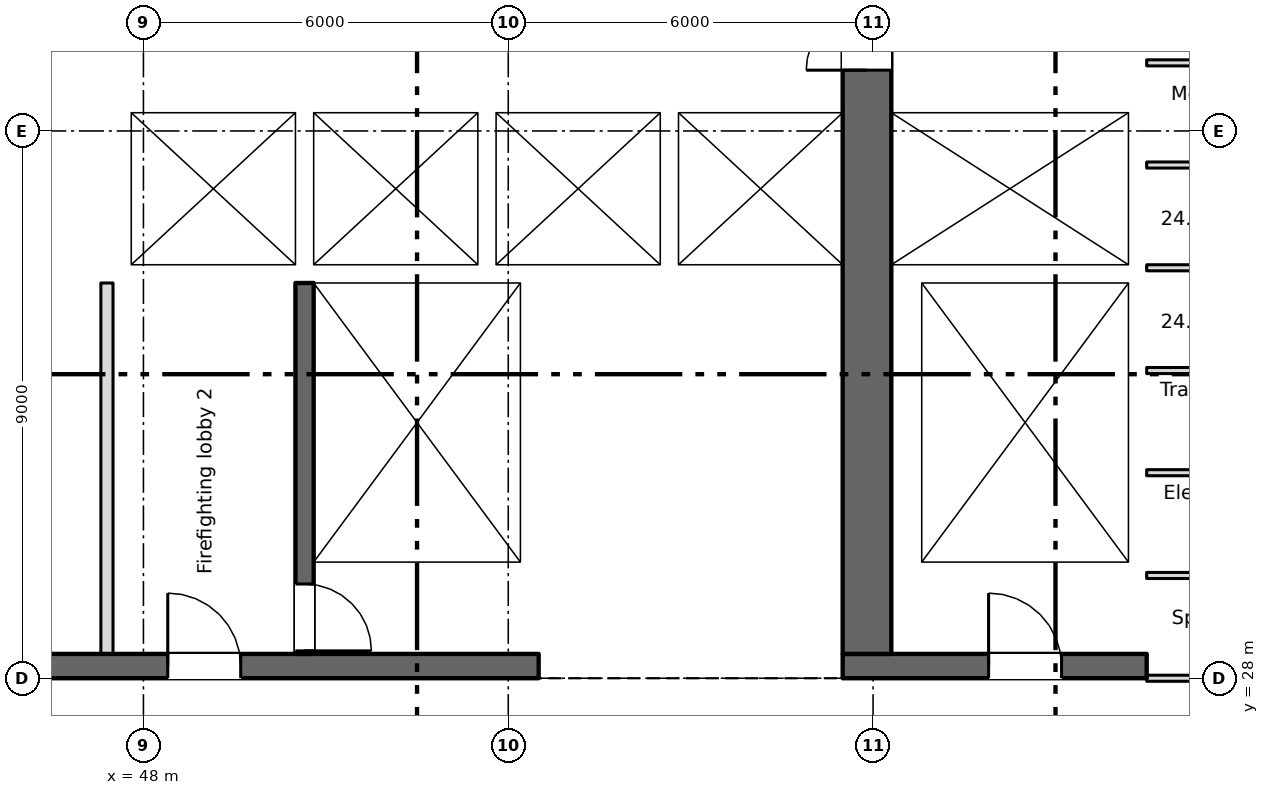
"""IFC4 building model, lengths in metres.
Left out: names, types, materials, properties, quantities, classifications, styles, units other than length and angle.
Written with IfcOpenShell. Run it as: python <this file> out.ifc"""

import sys

from ifc_helpers import new_model, si_unit, direction, frame, frame_2d, origin, place, context, subcontext, project, spatial, rectangle, extrude, element, fill, save


model = new_model("IFC4")
c1 = context("Model", 3, precision=1e-05, world=origin(), true_north=direction((0.0, 1.0)))
c2 = subcontext(c1, "Body", "Model", "MODEL_VIEW")
j1 = project(units=[si_unit("LENGTHUNIT", "METRE"), si_unit("PLANEANGLEUNIT", "RADIAN")], contexts=[c1])
p1 = place(None, origin())
s1 = spatial("IfcSite", under=j1, at=p1, CompositionType="ELEMENT")
p2 = place(p1, origin())
s2 = spatial("IfcBuilding", under=s1, at=p2, CompositionType="ELEMENT")
p3 = place(p2, frame((0.0, 0.0, 158.75)))
s3 = spatial("IfcBuildingStorey", under=s2, at=p3, CompositionType="ELEMENT", Elevation=158.75)
p4 = place(p3, frame((54.5, 28.2, 0.0), z_axis=(0.0, 0.0, 1.0), x_axis=(-1.0, 0.0, 0.0)))
e1 = element("IfcWall", 1, at=p4, inside=s3, PredefinedType="SHEAR", context=c2, shape_type="SweptSolid", body=[
    extrude(rectangle(XDim=31.0, YDim=0.4, at=frame_2d((15.5, 0.0))), origin(), (0.0, 0.0, 1.0), 7.2),
])
p5 = place(p4, frame((14.9, 0.0, 0.0)))
e2 = element("IfcOpeningElement", 2, at=p5, cuts=e1, PredefinedType="OPENING", context=c2, shape_type="SweptSolid", body=[
    extrude(rectangle(XDim=1.2, YDim=2.1, at=frame_2d((0.6, 1.05))), frame((0.0, 0.21, 0.0), z_axis=(0.0, -1.0, 0.0), x_axis=(1.0, 0.0, 0.0)), (0.0, 0.0, 1.0), 0.42),
])
p6 = place(p4, frame((24.9, 0.0, 0.0)))
e3 = element("IfcOpeningElement", 3, at=p6, cuts=e1, PredefinedType="OPENING", context=c2, shape_type="SweptSolid", body=[
    extrude(rectangle(XDim=1.2, YDim=2.1, at=frame_2d((0.6, 1.05))), frame((0.0, 0.21, 0.0), z_axis=(0.0, -1.0, 0.0), x_axis=(1.0, 0.0, 0.0)), (0.0, 0.0, 1.0), 0.42),
])
p7 = place(p4, frame((4.9, 0.0, 0.0)))
e4 = element("IfcOpeningElement", 4, at=p7, cuts=e1, PredefinedType="OPENING", context=c2, shape_type="SweptSolid", body=[
    extrude(rectangle(XDim=1.2, YDim=2.1, at=frame_2d((0.6, 1.05))), frame((0.0, 0.21, 0.0), z_axis=(0.0, -1.0, 0.0), x_axis=(1.0, 0.0, 0.0)), (0.0, 0.0, 1.0), 0.42),
])
p8 = place(p4, frame((20.55, 0.0, 0.0)))
e5 = element("IfcOpeningElement", 5, at=p8, cuts=e1, PredefinedType="OPENING", context=c2, shape_type="SweptSolid", body=[
    extrude(rectangle(XDim=2.4, YDim=2.1, at=frame_2d((1.2, 1.05))), frame((0.0, 0.21, 0.0), z_axis=(0.0, -1.0, 0.0), x_axis=(1.0, 0.0, 0.0)), (0.0, 0.0, 1.0), 0.42),
])
p9 = place(p4, frame((8.05, 0.0, 0.0)))
e6 = element("IfcOpeningElement", 6, at=p9, cuts=e1, PredefinedType="OPENING", context=c2, shape_type="SweptSolid", body=[
    extrude(rectangle(XDim=2.4, YDim=2.1, at=frame_2d((1.2, 1.05))), frame((0.0, 0.21, 0.0), z_axis=(0.0, -1.0, 0.0), x_axis=(1.0, 0.0, 0.0)), (0.0, 0.0, 1.0), 0.42),
])
p10 = place(p4, frame((18.05, 0.0, 0.0)))
e7 = element("IfcOpeningElement", 7, at=p10, cuts=e1, PredefinedType="OPENING", context=c2, shape_type="SweptSolid", body=[
    extrude(rectangle(XDim=0.9, YDim=2.1, at=frame_2d((0.45, 1.05))), frame((0.0, 0.21, 0.0), z_axis=(0.0, -1.0, 0.0), x_axis=(1.0, 0.0, 0.0)), (0.0, 0.0, 1.0), 0.42),
])
p11 = place(p4, frame((12.05, 0.0, 0.0)))
e8 = element("IfcOpeningElement", 8, at=p11, cuts=e1, PredefinedType="OPENING", context=c2, shape_type="SweptSolid", body=[
    extrude(rectangle(XDim=0.9, YDim=2.1, at=frame_2d((0.45, 1.05))), frame((0.0, 0.21, 0.0), z_axis=(0.0, -1.0, 0.0), x_axis=(1.0, 0.0, 0.0)), (0.0, 0.0, 1.0), 0.42),
])
p12 = place(p3, frame((59.5, 28.2, 0.0), z_axis=(0.0, 0.0, 1.0), x_axis=(1.0, 0.0, 0.0)))
e9 = element("IfcWall", 9, at=p12, inside=s3, PredefinedType="SHEAR", context=c2, shape_type="SweptSolid", body=[
    extrude(rectangle(XDim=5.0, YDim=0.4, at=frame_2d((2.5, 0.0))), origin(), (0.0, 0.0, 1.0), 7.2),
])
p13 = place(p12, frame((2.4, 0.0, 0.0)))
e10 = element("IfcOpeningElement", 10, at=p13, cuts=e9, PredefinedType="OPENING", context=c2, shape_type="SweptSolid", body=[
    extrude(rectangle(XDim=1.2, YDim=2.1, at=frame_2d((0.6, 1.05))), frame((0.0, 0.21, 0.0), z_axis=(0.0, -1.0, 0.0), x_axis=(1.0, 0.0, 0.0)), (0.0, 0.0, 1.0), 0.42),
])
p14 = place(p3, frame((64.35, 34.8, 0.0), z_axis=(0.0, 0.0, 1.0), x_axis=(0.0, 1.0, 0.0)))
e11 = element("IfcWall", 11, at=p14, inside=s3, PredefinedType="SHEAR", context=c2, shape_type="SweptSolid", body=[
    extrude(rectangle(XDim=10.4, YDim=0.3, at=frame_2d((5.2, 0.0))), origin(), (0.0, 0.0, 1.0), 7.2),
])
p15 = place(p3, frame((59.9, 28.4, 0.0), z_axis=(0.0, 0.0, 1.0), x_axis=(0.0, 1.0, 0.0)))
e12 = element("IfcWall", 12, at=p15, inside=s3, PredefinedType="SHEAR", context=c2, shape_type="SweptSolid", body=[
    extrude(rectangle(XDim=16.8, YDim=0.8, at=frame_2d((8.4, 0.0))), origin(), (0.0, 0.0, 1.0), 7.2),
])
p16 = place(p15, frame((9.6, 0.0, 0.0)))
e13 = element("IfcOpeningElement", 13, at=p16, cuts=e12, PredefinedType="OPENING", context=c2, shape_type="SweptSolid", body=[
    extrude(rectangle(XDim=2.0, YDim=2.1, at=frame_2d((1.0, 1.05))), frame((0.0, 0.41, 0.0), z_axis=(0.0, -1.0, 0.0), x_axis=(1.0, 0.0, 0.0)), (0.0, 0.0, 1.0), 0.82),
])
p17 = place(p15, frame((15.35, 0.0, 0.0)))
e14 = element("IfcOpeningElement", 14, at=p17, cuts=e12, PredefinedType="OPENING", context=c2, shape_type="SweptSolid", body=[
    extrude(rectangle(XDim=1.2, YDim=2.1, at=frame_2d((0.6, 1.05))), frame((0.0, 0.41, 0.0), z_axis=(0.0, -1.0, 0.0), x_axis=(1.0, 0.0, 0.0)), (0.0, 0.0, 1.0), 0.82),
])
p18 = place(p3, frame((50.65, 34.5, 0.0), z_axis=(0.0, 0.0, 1.0), x_axis=(0.0, -1.0, 0.0)))
e15 = element("IfcWall", 15, at=p18, inside=s3, PredefinedType="SHEAR", context=c2, shape_type="SweptSolid", body=[
    extrude(rectangle(XDim=6.1, YDim=0.3, at=frame_2d((3.05, 0.0))), origin(), (0.0, 0.0, 1.0), 7.2),
])
p19 = place(p18, frame((4.95, 0.0, 0.0)))
e16 = element("IfcOpeningElement", 16, at=p19, cuts=e15, PredefinedType="OPENING", context=c2, shape_type="SweptSolid", body=[
    extrude(rectangle(XDim=1.1, YDim=2.1, at=frame_2d((0.55, 1.05))), frame((0.0, 0.16, 0.0), z_axis=(0.0, -1.0, 0.0), x_axis=(1.0, 0.0, 0.0)), (0.0, 0.0, 1.0), 0.32),
])
p20 = place(p3, frame((54.35, 28.4, 0.0), z_axis=(0.0, 0.0, 1.0), x_axis=(0.0, 1.0, 0.0)))
e17 = element("IfcWall", 17, at=p20, inside=s3, PredefinedType="SHEAR", context=c2, shape_type="SweptSolid", body=[
    extrude(rectangle(XDim=6.1, YDim=0.3, at=frame_2d((3.05, 0.0))), origin(), (0.0, 0.0, 1.0), 7.2),
])
p21 = place(p3, frame((60.55, 28.4, 0.0), z_axis=(0.0, 0.0, 1.0), x_axis=(0.0, 1.0, 0.0)))
e18 = element("IfcWall", 18, at=p21, inside=s3, PredefinedType="SHEAR", context=c2, shape_type="SweptSolid", body=[
    extrude(rectangle(XDim=6.1, YDim=0.5, at=frame_2d((3.05, 0.0))), origin(), (0.0, 0.0, 1.0), 7.2),
])
p22 = place(p3, frame((64.35, 28.4, 0.0), z_axis=(0.0, 0.0, 1.0), x_axis=(0.0, 1.0, 0.0)))
e19 = element("IfcWall", 19, at=p22, inside=s3, PredefinedType="SHEAR", context=c2, shape_type="SweptSolid", body=[
    extrude(rectangle(XDim=6.1, YDim=0.3, at=frame_2d((3.05, 0.0))), origin(), (0.0, 0.0, 1.0), 7.2),
])
p23 = place(p3, frame((47.3, 34.65, 0.0), z_axis=(0.0, 0.0, 1.0), x_axis=(1.0, 0.0, 0.0)))
e20 = element("IfcWall", 20, at=p23, inside=s3, PredefinedType="SHEAR", context=c2, shape_type="SweptSolid", body=[
    extrude(rectangle(XDim=12.2, YDim=0.3, at=frame_2d((6.1, 0.0))), origin(), (0.0, 0.0, 1.0), 7.2),
])
p24 = place(p23, frame((1.3, 0.0, 0.0)))
e21 = element("IfcOpeningElement", 21, at=p24, cuts=e20, PredefinedType="OPENING", context=c2, shape_type="SweptSolid", body=[
    extrude(rectangle(XDim=1.1, YDim=2.1, at=frame_2d((0.55, 1.05))), frame((0.0, 0.16, 0.0), z_axis=(0.0, -1.0, 0.0), x_axis=(1.0, 0.0, 0.0)), (0.0, 0.0, 1.0), 0.32),
])
p25 = place(p3, frame((60.3, 34.65, 0.0), z_axis=(0.0, 0.0, 1.0), x_axis=(1.0, 0.0, 0.0)))
e22 = element("IfcWall", 22, at=p25, inside=s3, PredefinedType="SHEAR", context=c2, shape_type="SweptSolid", body=[
    extrude(rectangle(XDim=4.2, YDim=0.3, at=frame_2d((2.1, 0.0))), origin(), (0.0, 0.0, 1.0), 7.2),
])
p26 = place(p3, frame((47.3, 37.45, 0.0), z_axis=(0.0, 0.0, 1.0), x_axis=(1.0, 0.0, 0.0)))
e23 = element("IfcWall", 23, at=p26, inside=s3, PredefinedType="SHEAR", context=c2, shape_type="SweptSolid", body=[
    extrude(rectangle(XDim=12.2, YDim=0.3, at=frame_2d((6.1, 0.0))), origin(), (0.0, 0.0, 1.0), 7.2),
])
p27 = place(p26, frame((3.7, 0.0, 0.0)))
e24 = element("IfcOpeningElement", 24, at=p27, cuts=e23, PredefinedType="OPENING", context=c2, shape_type="SweptSolid", body=[
    extrude(rectangle(XDim=1.1, YDim=2.1, at=frame_2d((0.55, 1.05))), frame((0.0, 0.16, 0.0), z_axis=(0.0, -1.0, 0.0), x_axis=(1.0, 0.0, 0.0)), (0.0, 0.0, 1.0), 0.32),
])
p28 = place(p26, frame((4.9, 0.0, 0.0)))
e25 = element("IfcOpeningElement", 25, at=p28, cuts=e23, PredefinedType="OPENING", context=c2, shape_type="SweptSolid", body=[
    extrude(rectangle(XDim=1.1, YDim=2.1, at=frame_2d((0.55, 1.05))), frame((0.0, 0.16, 0.0), z_axis=(0.0, -1.0, 0.0), x_axis=(1.0, 0.0, 0.0)), (0.0, 0.0, 1.0), 0.32),
])
p29 = place(p26, frame((6.7, 0.0, 0.0)))
e26 = element("IfcOpeningElement", 26, at=p29, cuts=e23, PredefinedType="OPENING", context=c2, shape_type="SweptSolid", body=[
    extrude(rectangle(XDim=1.1, YDim=2.1, at=frame_2d((0.55, 1.05))), frame((0.0, 0.16, 0.0), z_axis=(0.0, -1.0, 0.0), x_axis=(1.0, 0.0, 0.0)), (0.0, 0.0, 1.0), 0.32),
])
p30 = place(p26, frame((7.9, 0.0, 0.0)))
e27 = element("IfcOpeningElement", 27, at=p30, cuts=e23, PredefinedType="OPENING", context=c2, shape_type="SweptSolid", body=[
    extrude(rectangle(XDim=1.1, YDim=2.1, at=frame_2d((0.55, 1.05))), frame((0.0, 0.16, 0.0), z_axis=(0.0, -1.0, 0.0), x_axis=(1.0, 0.0, 0.0)), (0.0, 0.0, 1.0), 0.32),
])
p31 = place(p26, frame((9.7, 0.0, 0.0)))
e28 = element("IfcOpeningElement", 28, at=p31, cuts=e23, PredefinedType="OPENING", context=c2, shape_type="SweptSolid", body=[
    extrude(rectangle(XDim=1.1, YDim=2.1, at=frame_2d((0.55, 1.05))), frame((0.0, 0.16, 0.0), z_axis=(0.0, -1.0, 0.0), x_axis=(1.0, 0.0, 0.0)), (0.0, 0.0, 1.0), 0.32),
])
p32 = place(p26, frame((10.9, 0.0, 0.0)))
e29 = element("IfcOpeningElement", 29, at=p32, cuts=e23, PredefinedType="OPENING", context=c2, shape_type="SweptSolid", body=[
    extrude(rectangle(XDim=1.1, YDim=2.1, at=frame_2d((0.55, 1.05))), frame((0.0, 0.16, 0.0), z_axis=(0.0, -1.0, 0.0), x_axis=(1.0, 0.0, 0.0)), (0.0, 0.0, 1.0), 0.32),
])
p33 = place(p3, frame((60.3, 37.45, 0.0), z_axis=(0.0, 0.0, 1.0), x_axis=(1.0, 0.0, 0.0)))
e30 = element("IfcWall", 30, at=p33, inside=s3, PredefinedType="SHEAR", context=c2, shape_type="SweptSolid", body=[
    extrude(rectangle(XDim=3.9, YDim=0.3, at=frame_2d((1.95, 0.0))), origin(), (0.0, 0.0, 1.0), 7.2),
])
p34 = place(p33, frame((1.4, 0.0, 0.0)))
e31 = element("IfcOpeningElement", 31, at=p34, cuts=e30, PredefinedType="OPENING", context=c2, shape_type="SweptSolid", body=[
    extrude(rectangle(XDim=1.1, YDim=2.1, at=frame_2d((0.55, 1.05))), frame((0.0, 0.16, 0.0), z_axis=(0.0, -1.0, 0.0), x_axis=(1.0, 0.0, 0.0)), (0.0, 0.0, 1.0), 0.32),
])
p35 = place(p3, frame((47.55, 34.8, 0.0), z_axis=(0.0, 0.0, 1.0), x_axis=(0.0, 1.0, 0.0)))
e32 = element("IfcWall", 32, at=p35, inside=s3, PredefinedType="SHEAR", context=c2, shape_type="SweptSolid", body=[
    extrude(rectangle(XDim=2.5, YDim=0.5, at=frame_2d((1.25, 0.0))), origin(), (0.0, 0.0, 1.0), 7.2),
])
for number, where, z_axis, x_axis in (
    (33, (50.65, 34.8, 0.0), (0.0, 0.0, 1.0), (0.0, 1.0, 0.0)),
    (34, (53.65, 34.8, 0.0), (0.0, 0.0, 1.0), (0.0, 1.0, 0.0)),
    (35, (56.65, 34.8, 0.0), (0.0, 0.0, 1.0), (0.0, 1.0, 0.0)),
):
    element("IfcWall", number, at=place(p3, frame(where, z_axis=z_axis, x_axis=x_axis)), inside=s3, PredefinedType="SHEAR", context=c2, shape_type="SweptSolid", body=[
        extrude(rectangle(XDim=2.5, YDim=0.3, at=frame_2d((1.25, 0.0))), origin(), (0.0, 0.0, 1.0), 7.2),
    ])
p36 = place(p3, frame((47.4, 28.4, 0.0), z_axis=(0.0, 0.0, 1.0), x_axis=(0.0, 1.0, 0.0)))
e36 = element("IfcWall", 36, at=p36, inside=s3, PredefinedType="PARTITIONING", context=c2, shape_type="SweptSolid", body=[
    extrude(rectangle(XDim=6.1, YDim=0.2, at=frame_2d((3.05, 0.0))), origin(), (0.0, 0.0, 1.0), 7.2),
])
p37 = place(p3, frame((64.5, 28.0, 0.0), z_axis=(0.0, 0.0, 1.0), x_axis=(1.0, 0.0, 0.0)))
e37 = element("IfcWall", 37, at=p37, inside=s3, PredefinedType="PARTITIONING", context=c2, shape_type="SweptSolid", body=[
    extrude(rectangle(XDim=6.8, YDim=0.1, at=frame_2d((3.4, 0.0))), origin(), (0.0, 0.0, 1.0), 7.2),
])
p38 = place(p37, frame((4.6, 0.0, 0.0)))
e38 = element("IfcOpeningElement", 38, at=p38, cuts=e37, PredefinedType="OPENING", context=c2, shape_type="SweptSolid", body=[
    extrude(rectangle(XDim=1.8, YDim=2.1, at=frame_2d((0.9, 1.05))), frame((0.0, 0.06, 0.0), z_axis=(0.0, -1.0, 0.0), x_axis=(1.0, 0.0, 0.0)), (0.0, 0.0, 1.0), 0.12),
])
for number, where, z_axis, x_axis in (
    (39, (64.5, 29.69, 0.0), (0.0, 0.0, 1.0), (1.0, 0.0, 0.0)),
    (40, (64.5, 31.38, 0.0), (0.0, 0.0, 1.0), (1.0, 0.0, 0.0)),
    (41, (64.5, 33.06, 0.0), (0.0, 0.0, 1.0), (1.0, 0.0, 0.0)),
    (42, (64.5, 34.75, 0.0), (0.0, 0.0, 1.0), (1.0, 0.0, 0.0)),
    (43, (64.5, 36.44, 0.0), (0.0, 0.0, 1.0), (1.0, 0.0, 0.0)),
    (44, (64.5, 38.12, 0.0), (0.0, 0.0, 1.0), (1.0, 0.0, 0.0)),
):
    element("IfcWall", number, at=place(p3, frame(where, z_axis=z_axis, x_axis=x_axis)), inside=s3, PredefinedType="PARTITIONING", context=c2, shape_type="SweptSolid", body=[
        extrude(rectangle(XDim=4.35, YDim=0.1, at=frame_2d((2.175, 0.0))), origin(), (0.0, 0.0, 1.0), 7.2),
    ])
p39 = place(p27, origin())
e45 = element("IfcDoor", 45, at=p39, inside=s3, OperationType="SLIDING_TO_LEFT", PredefinedType="DOOR", context=c2, shape_type="SweptSolid", body=[
    extrude(rectangle(XDim=1.1, YDim=2.1, at=frame_2d((0.55, 1.05))), frame((0.0, 0.025, 0.0), z_axis=(0.0, -1.0, 0.0), x_axis=(1.0, 0.0, 0.0)), (0.0, 0.0, 1.0), 0.05),
])
fill(e24, e45)
p40 = place(p28, origin())
e46 = element("IfcDoor", 46, at=p40, inside=s3, OperationType="SLIDING_TO_LEFT", PredefinedType="DOOR", context=c2, shape_type="SweptSolid", body=[
    extrude(rectangle(XDim=1.1, YDim=2.1, at=frame_2d((0.55, 1.05))), frame((0.0, 0.025, 0.0), z_axis=(0.0, -1.0, 0.0), x_axis=(1.0, 0.0, 0.0)), (0.0, 0.0, 1.0), 0.05),
])
fill(e25, e46)
p41 = place(p29, origin())
e47 = element("IfcDoor", 47, at=p41, inside=s3, OperationType="SLIDING_TO_LEFT", PredefinedType="DOOR", context=c2, shape_type="SweptSolid", body=[
    extrude(rectangle(XDim=1.1, YDim=2.1, at=frame_2d((0.55, 1.05))), frame((0.0, 0.025, 0.0), z_axis=(0.0, -1.0, 0.0), x_axis=(1.0, 0.0, 0.0)), (0.0, 0.0, 1.0), 0.05),
])
fill(e26, e47)
p42 = place(p30, origin())
e48 = element("IfcDoor", 48, at=p42, inside=s3, OperationType="SLIDING_TO_LEFT", PredefinedType="DOOR", context=c2, shape_type="SweptSolid", body=[
    extrude(rectangle(XDim=1.1, YDim=2.1, at=frame_2d((0.55, 1.05))), frame((0.0, 0.025, 0.0), z_axis=(0.0, -1.0, 0.0), x_axis=(1.0, 0.0, 0.0)), (0.0, 0.0, 1.0), 0.05),
])
fill(e27, e48)
p43 = place(p31, origin())
e49 = element("IfcDoor", 49, at=p43, inside=s3, OperationType="SLIDING_TO_LEFT", PredefinedType="DOOR", context=c2, shape_type="SweptSolid", body=[
    extrude(rectangle(XDim=1.1, YDim=2.1, at=frame_2d((0.55, 1.05))), frame((0.0, 0.025, 0.0), z_axis=(0.0, -1.0, 0.0), x_axis=(1.0, 0.0, 0.0)), (0.0, 0.0, 1.0), 0.05),
])
fill(e28, e49)
p44 = place(p32, origin())
e50 = element("IfcDoor", 50, at=p44, inside=s3, OperationType="SLIDING_TO_LEFT", PredefinedType="DOOR", context=c2, shape_type="SweptSolid", body=[
    extrude(rectangle(XDim=1.1, YDim=2.1, at=frame_2d((0.55, 1.05))), frame((0.0, 0.025, 0.0), z_axis=(0.0, -1.0, 0.0), x_axis=(1.0, 0.0, 0.0)), (0.0, 0.0, 1.0), 0.05),
])
fill(e29, e50)
p45 = place(p34, origin())
e51 = element("IfcDoor", 51, at=p45, inside=s3, OperationType="SLIDING_TO_LEFT", PredefinedType="DOOR", context=c2, shape_type="SweptSolid", body=[
    extrude(rectangle(XDim=1.1, YDim=2.1, at=frame_2d((0.55, 1.05))), frame((0.0, 0.025, 0.0), z_axis=(0.0, -1.0, 0.0), x_axis=(1.0, 0.0, 0.0)), (0.0, 0.0, 1.0), 0.05),
])
fill(e31, e51)
p46 = place(p24, origin())
e52 = element("IfcDoor", 52, at=p46, inside=s3, OperationType="SLIDING_TO_LEFT", PredefinedType="DOOR", context=c2, shape_type="SweptSolid", body=[
    extrude(rectangle(XDim=1.1, YDim=2.1, at=frame_2d((0.55, 1.05))), frame((0.0, 0.025, 0.0), z_axis=(0.0, -1.0, 0.0), x_axis=(1.0, 0.0, 0.0)), (0.0, 0.0, 1.0), 0.05),
])
fill(e21, e52)
p47 = place(p19, origin())
e53 = element("IfcDoor", 53, at=p47, inside=s3, OperationType="SINGLE_SWING_RIGHT", PredefinedType="DOOR", context=c2, shape_type="SweptSolid", body=[
    extrude(rectangle(XDim=1.1, YDim=2.1, at=frame_2d((0.55, 1.05))), frame((0.0, 0.025, 0.0), z_axis=(0.0, -1.0, 0.0), x_axis=(1.0, 0.0, 0.0)), (0.0, 0.0, 1.0), 0.05),
])
fill(e16, e53)
p48 = place(p13, origin())
e54 = element("IfcDoor", 54, at=p48, inside=s3, OperationType="SINGLE_SWING_LEFT", PredefinedType="DOOR", context=c2, shape_type="SweptSolid", body=[
    extrude(rectangle(XDim=1.2, YDim=2.1, at=frame_2d((0.6, 1.05))), frame((0.0, 0.025, 0.0), z_axis=(0.0, -1.0, 0.0), x_axis=(1.0, 0.0, 0.0)), (0.0, 0.0, 1.0), 0.05),
])
fill(e10, e54)
p49 = place(p7, origin())
e55 = element("IfcDoor", 55, at=p49, inside=s3, OperationType="SINGLE_SWING_RIGHT", PredefinedType="DOOR", context=c2, shape_type="SweptSolid", body=[
    extrude(rectangle(XDim=1.2, YDim=2.1, at=frame_2d((0.6, 1.05))), frame((0.0, 0.025, 0.0), z_axis=(0.0, -1.0, 0.0), x_axis=(1.0, 0.0, 0.0)), (0.0, 0.0, 1.0), 0.05),
])
fill(e4, e55)
p50 = place(p16, origin())
e56 = element("IfcDoor", 56, at=p50, inside=s3, OperationType="DOUBLE_DOOR_SINGLE_SWING", PredefinedType="DOOR", context=c2, shape_type="SweptSolid", body=[
    extrude(rectangle(XDim=2.0, YDim=2.1, at=frame_2d((1.0, 1.05))), frame((0.0, 0.025, 0.0), z_axis=(0.0, -1.0, 0.0), x_axis=(1.0, 0.0, 0.0)), (0.0, 0.0, 1.0), 0.05),
])
fill(e13, e56)
save(model, sys.argv[1])
